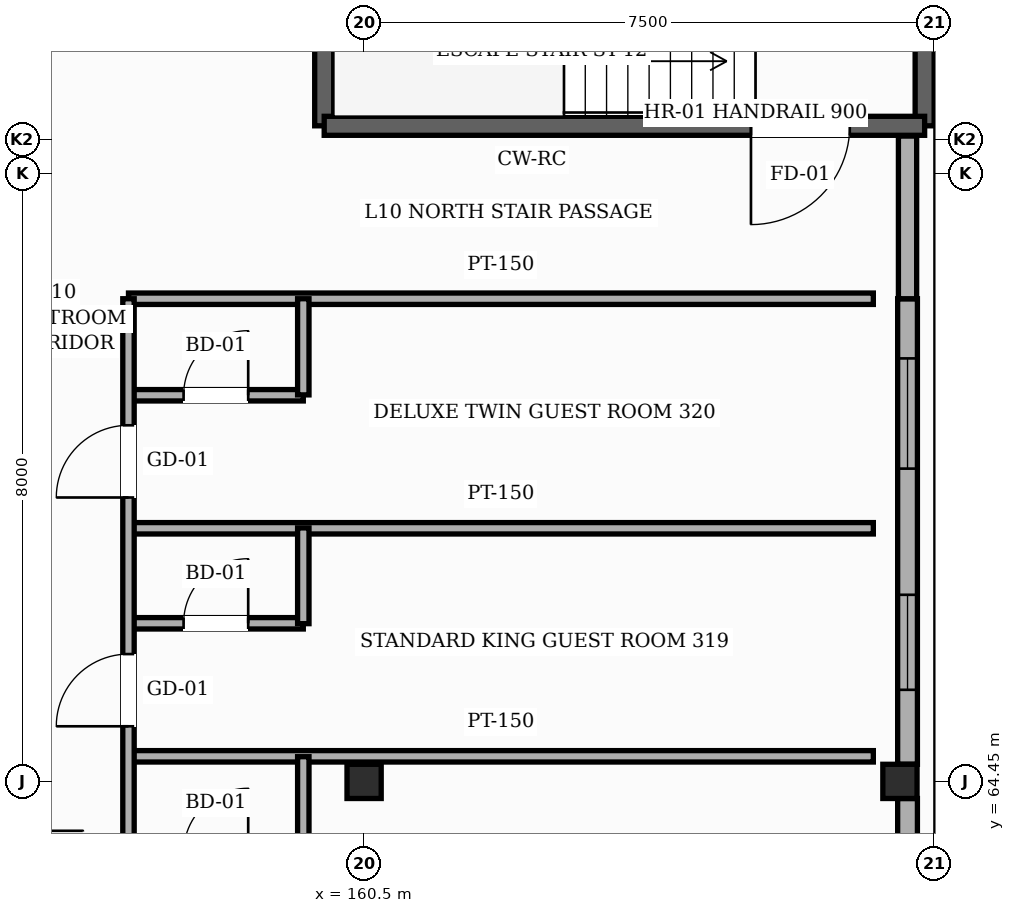
"""IFC4 building model, lengths in metres.
Left out: names, types, materials, properties, quantities, classifications, styles, units other than length and angle.
Written with IfcOpenShell. Run it as: python <this file> out.ifc"""

import sys

from ifc_helpers import new_model, si_unit, direction, frame, frame_2d, origin, origin_2d, place, context, subcontext, project, spatial, rectangle, hollow_rectangle, extrude, element, fill, save


model = new_model("IFC4")
c1 = context("Model", 3, precision=1e-05, world=origin(), true_north=direction((0.0, 1.0)))
c2 = subcontext(c1, "Body", "Model", "MODEL_VIEW")
j1 = project(units=[si_unit("LENGTHUNIT", "METRE"), si_unit("PLANEANGLEUNIT", "RADIAN")], contexts=[c1])
p1 = place(None, origin())
s1 = spatial("IfcSite", under=j1, at=p1, CompositionType="ELEMENT")
p2 = place(p1, origin())
s2 = spatial("IfcBuilding", under=s1, at=p2, CompositionType="ELEMENT")
p3 = place(p2, frame((0.0, 0.0, 42.6)))
s3 = spatial("IfcBuildingStorey", under=s2, at=p3, CompositionType="ELEMENT", Elevation=42.6)
for number, where, z_axis, x_axis in (
    (1, (160.5, 64.45, 0.0), (0.0, 0.0, 1.0), (1.0, 0.0, 0.0)),
    (2, (167.55, 64.45, 0.0), (0.0, 0.0, 1.0), (1.0, 0.0, 0.0)),
):
    element("IfcColumn", number, at=place(p3, frame(where, z_axis=z_axis, x_axis=x_axis)), inside=s3, PredefinedType="COLUMN", context=c2, shape_type="SweptSolid", body=[
        extrude(hollow_rectangle(XDim=0.45, YDim=0.45, WallThickness=0.019, InnerFilletRadius=0.019, OuterFilletRadius=0.038, at=origin_2d()), origin(), (0.0, 0.0, 1.0), 3.6),
    ])
p4 = place(p3, frame((167.65, 64.225, 0.0), z_axis=(0.0, 0.0, 1.0), x_axis=(0.0, -1.0, 0.0)))
e3 = element("IfcWall", 3, at=p4, inside=s3, PredefinedType="SOLIDWALL", context=c2, shape_type="SweptSolid", body=[
    extrude(rectangle(XDim=7.55, YDim=0.26, at=frame_2d((3.775, 0.0))), origin(), (0.0, 0.0, 1.0), 2.755),
])
p5 = place(p4, frame((6.085, 0.0, 0.85)))
e4 = element("IfcOpeningElement", 4, at=p5, cuts=e3, PredefinedType="OPENING", context=c2, shape_type="SweptSolid", body=[
    extrude(rectangle(XDim=0.85, YDim=1.35, at=frame_2d((0.425, 0.675))), frame((0.0, 0.14, 0.0), z_axis=(0.0, -1.0, 0.0), x_axis=(1.0, 0.0, 0.0)), (0.0, 0.0, 1.0), 0.28),
])
p6 = place(p4, frame((2.92, 0.0, 0.85)))
e5 = element("IfcOpeningElement", 5, at=p6, cuts=e3, PredefinedType="OPENING", context=c2, shape_type="SweptSolid", body=[
    extrude(rectangle(XDim=2.1, YDim=1.35, at=frame_2d((1.05, 0.675))), frame((0.0, 0.14, 0.0), z_axis=(0.0, -1.0, 0.0), x_axis=(1.0, 0.0, 0.0)), (0.0, 0.0, 1.0), 0.28),
])
p7 = place(p4, frame((0.81, 0.0, 0.85)))
e6 = element("IfcOpeningElement", 6, at=p7, cuts=e3, PredefinedType="OPENING", context=c2, shape_type="SweptSolid", body=[
    extrude(rectangle(XDim=0.85, YDim=1.35, at=frame_2d((0.425, 0.675))), frame((0.0, 0.14, 0.0), z_axis=(0.0, -1.0, 0.0), x_axis=(1.0, 0.0, 0.0)), (0.0, 0.0, 1.0), 0.28),
])
p8 = place(p3, frame((167.65, 70.8, 0.0), z_axis=(0.0, 0.0, 1.0), x_axis=(0.0, -1.0, 0.0)))
e7 = element("IfcWall", 7, at=p8, inside=s3, PredefinedType="SOLIDWALL", context=c2, shape_type="SweptSolid", body=[
    extrude(rectangle(XDim=6.125, YDim=0.26, at=frame_2d((3.062, 0.0))), origin(), (0.0, 0.0, 1.0), 3.365),
])
p9 = place(p8, frame((3.895, 0.0, 0.85)))
e8 = element("IfcOpeningElement", 8, at=p9, cuts=e7, PredefinedType="OPENING", context=c2, shape_type="SweptSolid", body=[
    extrude(rectangle(XDim=1.25, YDim=1.95, at=frame_2d((0.625, 0.975))), frame((0.0, 0.14, 0.0), z_axis=(0.0, -1.0, 0.0), x_axis=(1.0, 0.0, 0.0)), (0.0, 0.0, 1.0), 0.28),
])
p10 = place(p8, frame((0.785, 0.0, 0.85)))
e9 = element("IfcOpeningElement", 9, at=p10, cuts=e7, PredefinedType="OPENING", context=c2, shape_type="SweptSolid", body=[
    extrude(rectangle(XDim=1.45, YDim=1.95, at=frame_2d((0.725, 0.975))), frame((0.0, 0.14, 0.0), z_axis=(0.0, -1.0, 0.0), x_axis=(1.0, 0.0, 0.0)), (0.0, 0.0, 1.0), 0.28),
])
p11 = place(p3, frame((167.65, 72.94, 0.0), z_axis=(0.0, 0.0, 1.0), x_axis=(0.0, -1.0, 0.0)))
e10 = element("IfcWall", 10, at=p11, inside=s3, PredefinedType="SOLIDWALL", context=c2, shape_type="SweptSolid", body=[
    extrude(rectangle(XDim=2.14, YDim=0.24, at=frame_2d((1.07, 0.0))), origin(), (0.0, 0.0, 1.0), 3.365),
])
for number, where, z_axis, x_axis in (
    (11, (167.875, 76.425, 0.0), (0.0, 0.0, 1.0), (0.0, -1.0, 0.0)),
    (12, (159.975, 73.075, 0.0), (0.0, 0.0, 1.0), (0.0, 1.0, 0.0)),
):
    element("IfcWall", number, at=place(p3, frame(where, z_axis=z_axis, x_axis=x_axis)), inside=s3, PredefinedType="SHEAR", context=c2, shape_type="SweptSolid", body=[
        extrude(rectangle(XDim=3.35, YDim=0.25, at=frame_2d((1.675, 0.0))), origin(), (0.0, 0.0, 1.0), 3.38),
    ])
p12 = place(p3, frame((167.875, 73.075, 0.0), z_axis=(0.0, 0.0, 1.0), x_axis=(-1.0, 0.0, 0.0)))
e13 = element("IfcWall", 13, at=p12, inside=s3, PredefinedType="SHEAR", context=c2, shape_type="SweptSolid", body=[
    extrude(rectangle(XDim=7.9, YDim=0.25, at=frame_2d((3.95, 0.0))), origin(), (0.0, 0.0, 1.0), 3.38),
])
p13 = place(p12, frame((0.985, 0.0, 0.0)))
e14 = element("IfcOpeningElement", 14, at=p13, cuts=e13, PredefinedType="OPENING", context=c2, shape_type="SweptSolid", body=[
    extrude(rectangle(XDim=1.3, YDim=2.2, at=frame_2d((0.65, 1.1))), frame((0.0, 0.135, 0.0), z_axis=(0.0, -1.0, 0.0), x_axis=(1.0, 0.0, 0.0)), (0.0, 0.0, 1.0), 0.27),
])
p14 = place(p3, frame((157.4, 64.78, 0.0), z_axis=(0.0, 0.0, 1.0), x_axis=(1.0, 0.0, 0.0)))
e15 = element("IfcWall", 15, at=p14, inside=s3, PredefinedType="PARTITIONING", context=c2, shape_type="SweptSolid", body=[
    extrude(rectangle(XDim=9.8, YDim=0.15, at=frame_2d((4.9, 0.0))), origin(), (0.0, 0.0, 1.0), 3.365),
])
p15 = place(p3, frame((157.4, 66.53, 0.0), z_axis=(0.0, 0.0, 1.0), x_axis=(1.0, 0.0, 0.0)))
e16 = element("IfcWall", 16, at=p15, inside=s3, PredefinedType="PARTITIONING", context=c2, shape_type="SweptSolid", body=[
    extrude(rectangle(XDim=2.3, YDim=0.15, at=frame_2d((1.15, 0.0))), origin(), (0.0, 0.0, 1.0), 3.365),
])
p16 = place(p15, frame((0.725, 0.0, 0.0)))
e17 = element("IfcOpeningElement", 17, at=p16, cuts=e16, PredefinedType="OPENING", context=c2, shape_type="SweptSolid", body=[
    extrude(rectangle(XDim=0.85, YDim=2.1, at=frame_2d((0.425, 1.05))), frame((0.0, 0.085, 0.0), z_axis=(0.0, -1.0, 0.0), x_axis=(1.0, 0.0, 0.0)), (0.0, 0.0, 1.0), 0.17),
])
p17 = place(p3, frame((157.4, 67.78, 0.0), z_axis=(0.0, 0.0, 1.0), x_axis=(1.0, 0.0, 0.0)))
e18 = element("IfcWall", 18, at=p17, inside=s3, PredefinedType="PARTITIONING", context=c2, shape_type="SweptSolid", body=[
    extrude(rectangle(XDim=9.8, YDim=0.15, at=frame_2d((4.9, 0.0))), origin(), (0.0, 0.0, 1.0), 3.365),
])
p18 = place(p3, frame((157.4, 69.53, 0.0), z_axis=(0.0, 0.0, 1.0), x_axis=(1.0, 0.0, 0.0)))
e19 = element("IfcWall", 19, at=p18, inside=s3, PredefinedType="PARTITIONING", context=c2, shape_type="SweptSolid", body=[
    extrude(rectangle(XDim=2.3, YDim=0.15, at=frame_2d((1.15, 0.0))), origin(), (0.0, 0.0, 1.0), 3.365),
])
p19 = place(p18, frame((0.725, 0.0, 0.0)))
e20 = element("IfcOpeningElement", 20, at=p19, cuts=e19, PredefinedType="OPENING", context=c2, shape_type="SweptSolid", body=[
    extrude(rectangle(XDim=0.85, YDim=2.1, at=frame_2d((0.425, 1.05))), frame((0.0, 0.085, 0.0), z_axis=(0.0, -1.0, 0.0), x_axis=(1.0, 0.0, 0.0)), (0.0, 0.0, 1.0), 0.17),
])
p20 = place(p3, frame((157.4, 70.8, 0.0), z_axis=(0.0, 0.0, 1.0), x_axis=(1.0, 0.0, 0.0)))
e21 = element("IfcWall", 21, at=p20, inside=s3, PredefinedType="PARTITIONING", context=c2, shape_type="SweptSolid", body=[
    extrude(rectangle(XDim=9.8, YDim=0.15, at=frame_2d((4.9, 0.0))), origin(), (0.0, 0.0, 1.0), 3.365),
])
p21 = place(p3, frame((157.4, 22.6, 0.0), z_axis=(0.0, 0.0, 1.0), x_axis=(0.0, 1.0, 0.0)))
e22 = element("IfcWall", 22, at=p21, inside=s3, PredefinedType="PARTITIONING", context=c2, shape_type="SweptSolid", body=[
    extrude(rectangle(XDim=48.2, YDim=0.15, at=frame_2d((24.1, 0.0))), origin(), (0.0, 0.0, 1.0), 3.365),
])
p22 = place(p21, frame((0.325, 0.0, 0.0)))
e23 = element("IfcOpeningElement", 23, at=p22, cuts=e22, PredefinedType="OPENING", context=c2, shape_type="SweptSolid", body=[
    extrude(rectangle(XDim=1.1, YDim=2.2, at=frame_2d((0.55, 1.1))), frame((0.0, 0.085, 0.0), z_axis=(0.0, -1.0, 0.0), x_axis=(1.0, 0.0, 0.0)), (0.0, 0.0, 1.0), 0.17),
])
p23 = place(p21, frame((3.41, 0.0, 0.0)))
e24 = element("IfcOpeningElement", 24, at=p23, cuts=e22, PredefinedType="OPENING", context=c2, shape_type="SweptSolid", body=[
    extrude(rectangle(XDim=0.95, YDim=2.15, at=frame_2d((0.475, 1.075))), frame((0.0, 0.085, 0.0), z_axis=(0.0, -1.0, 0.0), x_axis=(1.0, 0.0, 0.0)), (0.0, 0.0, 1.0), 0.17),
])
p24 = place(p21, frame((6.425, 0.0, 0.0)))
e25 = element("IfcOpeningElement", 25, at=p24, cuts=e22, PredefinedType="OPENING", context=c2, shape_type="SweptSolid", body=[
    extrude(rectangle(XDim=0.95, YDim=2.15, at=frame_2d((0.475, 1.075))), frame((0.0, 0.085, 0.0), z_axis=(0.0, -1.0, 0.0), x_axis=(1.0, 0.0, 0.0)), (0.0, 0.0, 1.0), 0.17),
])
p25 = place(p21, frame((9.44, 0.0, 0.0)))
e26 = element("IfcOpeningElement", 26, at=p25, cuts=e22, PredefinedType="OPENING", context=c2, shape_type="SweptSolid", body=[
    extrude(rectangle(XDim=0.95, YDim=2.15, at=frame_2d((0.475, 1.075))), frame((0.0, 0.085, 0.0), z_axis=(0.0, -1.0, 0.0), x_axis=(1.0, 0.0, 0.0)), (0.0, 0.0, 1.0), 0.17),
])
p26 = place(p21, frame((12.45, 0.0, 0.0)))
e27 = element("IfcOpeningElement", 27, at=p26, cuts=e22, PredefinedType="OPENING", context=c2, shape_type="SweptSolid", body=[
    extrude(rectangle(XDim=0.95, YDim=2.15, at=frame_2d((0.475, 1.075))), frame((0.0, 0.085, 0.0), z_axis=(0.0, -1.0, 0.0), x_axis=(1.0, 0.0, 0.0)), (0.0, 0.0, 1.0), 0.17),
])
p27 = place(p21, frame((15.46, 0.0, 0.0)))
e28 = element("IfcOpeningElement", 28, at=p27, cuts=e22, PredefinedType="OPENING", context=c2, shape_type="SweptSolid", body=[
    extrude(rectangle(XDim=0.95, YDim=2.15, at=frame_2d((0.475, 1.075))), frame((0.0, 0.085, 0.0), z_axis=(0.0, -1.0, 0.0), x_axis=(1.0, 0.0, 0.0)), (0.0, 0.0, 1.0), 0.17),
])
p28 = place(p21, frame((18.475, 0.0, 0.0)))
e29 = element("IfcOpeningElement", 29, at=p28, cuts=e22, PredefinedType="OPENING", context=c2, shape_type="SweptSolid", body=[
    extrude(rectangle(XDim=0.95, YDim=2.15, at=frame_2d((0.475, 1.075))), frame((0.0, 0.085, 0.0), z_axis=(0.0, -1.0, 0.0), x_axis=(1.0, 0.0, 0.0)), (0.0, 0.0, 1.0), 0.17),
])
p29 = place(p21, frame((21.49, 0.0, 0.0)))
e30 = element("IfcOpeningElement", 30, at=p29, cuts=e22, PredefinedType="OPENING", context=c2, shape_type="SweptSolid", body=[
    extrude(rectangle(XDim=0.95, YDim=2.15, at=frame_2d((0.475, 1.075))), frame((0.0, 0.085, 0.0), z_axis=(0.0, -1.0, 0.0), x_axis=(1.0, 0.0, 0.0)), (0.0, 0.0, 1.0), 0.17),
])
p30 = place(p21, frame((24.5, 0.0, 0.0)))
e31 = element("IfcOpeningElement", 31, at=p30, cuts=e22, PredefinedType="OPENING", context=c2, shape_type="SweptSolid", body=[
    extrude(rectangle(XDim=0.95, YDim=2.15, at=frame_2d((0.475, 1.075))), frame((0.0, 0.085, 0.0), z_axis=(0.0, -1.0, 0.0), x_axis=(1.0, 0.0, 0.0)), (0.0, 0.0, 1.0), 0.17),
])
p31 = place(p21, frame((27.51, 0.0, 0.0)))
e32 = element("IfcOpeningElement", 32, at=p31, cuts=e22, PredefinedType="OPENING", context=c2, shape_type="SweptSolid", body=[
    extrude(rectangle(XDim=0.95, YDim=2.15, at=frame_2d((0.475, 1.075))), frame((0.0, 0.085, 0.0), z_axis=(0.0, -1.0, 0.0), x_axis=(1.0, 0.0, 0.0)), (0.0, 0.0, 1.0), 0.17),
])
p32 = place(p21, frame((30.525, 0.0, 0.0)))
e33 = element("IfcOpeningElement", 33, at=p32, cuts=e22, PredefinedType="OPENING", context=c2, shape_type="SweptSolid", body=[
    extrude(rectangle(XDim=0.95, YDim=2.15, at=frame_2d((0.475, 1.075))), frame((0.0, 0.085, 0.0), z_axis=(0.0, -1.0, 0.0), x_axis=(1.0, 0.0, 0.0)), (0.0, 0.0, 1.0), 0.17),
])
p33 = place(p21, frame((33.54, 0.0, 0.0)))
e34 = element("IfcOpeningElement", 34, at=p33, cuts=e22, PredefinedType="OPENING", context=c2, shape_type="SweptSolid", body=[
    extrude(rectangle(XDim=0.95, YDim=2.15, at=frame_2d((0.475, 1.075))), frame((0.0, 0.085, 0.0), z_axis=(0.0, -1.0, 0.0), x_axis=(1.0, 0.0, 0.0)), (0.0, 0.0, 1.0), 0.17),
])
p34 = place(p21, frame((36.55, 0.0, 0.0)))
e35 = element("IfcOpeningElement", 35, at=p34, cuts=e22, PredefinedType="OPENING", context=c2, shape_type="SweptSolid", body=[
    extrude(rectangle(XDim=0.95, YDim=2.15, at=frame_2d((0.475, 1.075))), frame((0.0, 0.085, 0.0), z_axis=(0.0, -1.0, 0.0), x_axis=(1.0, 0.0, 0.0)), (0.0, 0.0, 1.0), 0.17),
])
p35 = place(p21, frame((39.56, 0.0, 0.0)))
e36 = element("IfcOpeningElement", 36, at=p35, cuts=e22, PredefinedType="OPENING", context=c2, shape_type="SweptSolid", body=[
    extrude(rectangle(XDim=0.95, YDim=2.15, at=frame_2d((0.475, 1.075))), frame((0.0, 0.085, 0.0), z_axis=(0.0, -1.0, 0.0), x_axis=(1.0, 0.0, 0.0)), (0.0, 0.0, 1.0), 0.17),
])
p36 = place(p21, frame((42.575, 0.0, 0.0)))
e37 = element("IfcOpeningElement", 37, at=p36, cuts=e22, PredefinedType="OPENING", context=c2, shape_type="SweptSolid", body=[
    extrude(rectangle(XDim=0.95, YDim=2.15, at=frame_2d((0.475, 1.075))), frame((0.0, 0.085, 0.0), z_axis=(0.0, -1.0, 0.0), x_axis=(1.0, 0.0, 0.0)), (0.0, 0.0, 1.0), 0.17),
])
p37 = place(p21, frame((45.585, 0.0, 0.0)))
e38 = element("IfcOpeningElement", 38, at=p37, cuts=e22, PredefinedType="OPENING", context=c2, shape_type="SweptSolid", body=[
    extrude(rectangle(XDim=0.95, YDim=2.15, at=frame_2d((0.475, 1.075))), frame((0.0, 0.085, 0.0), z_axis=(0.0, -1.0, 0.0), x_axis=(1.0, 0.0, 0.0)), (0.0, 0.0, 1.0), 0.17),
])
p38 = place(p3, frame((159.7, 63.51, 0.0), z_axis=(0.0, 0.0, 1.0), x_axis=(0.0, 1.0, 0.0)))
e39 = element("IfcWall", 39, at=p38, inside=s3, PredefinedType="PARTITIONING", context=c2, shape_type="SweptSolid", body=[
    extrude(rectangle(XDim=1.265, YDim=0.15, at=frame_2d((0.632, 0.0))), origin(), (0.0, 0.0, 1.0), 3.365),
])
p39 = place(p3, frame((159.7, 66.525, 0.0), z_axis=(0.0, 0.0, 1.0), x_axis=(0.0, 1.0, 0.0)))
e40 = element("IfcWall", 40, at=p39, inside=s3, PredefinedType="PARTITIONING", context=c2, shape_type="SweptSolid", body=[
    extrude(rectangle(XDim=1.26, YDim=0.15, at=frame_2d((0.63, 0.0))), origin(), (0.0, 0.0, 1.0), 3.365),
])
p40 = place(p3, frame((159.7, 69.535, 0.0), z_axis=(0.0, 0.0, 1.0), x_axis=(0.0, 1.0, 0.0)))
e41 = element("IfcWall", 41, at=p40, inside=s3, PredefinedType="PARTITIONING", context=c2, shape_type="SweptSolid", body=[
    extrude(rectangle(XDim=1.265, YDim=0.15, at=frame_2d((0.633, 0.0))), origin(), (0.0, 0.0, 1.0), 3.365),
])
p41 = place(p9, origin())
e42 = element("IfcWindow", 42, at=p41, inside=s3, PartitioningType="SINGLE_PANEL", PredefinedType="WINDOW", context=c2, shape_type="SweptSolid", body=[
    extrude(rectangle(XDim=1.25, YDim=1.95, at=frame_2d((0.625, 0.975))), frame((0.0, 0.03, 0.0), z_axis=(0.0, -1.0, 0.0), x_axis=(1.0, 0.0, 0.0)), (0.0, 0.0, 1.0), 0.06),
])
fill(e8, e42)
p42 = place(p10, origin())
e43 = element("IfcWindow", 43, at=p42, inside=s3, PartitioningType="SINGLE_PANEL", PredefinedType="WINDOW", context=c2, shape_type="SweptSolid", body=[
    extrude(rectangle(XDim=1.45, YDim=1.95, at=frame_2d((0.725, 0.975))), frame((0.0, 0.03, 0.0), z_axis=(0.0, -1.0, 0.0), x_axis=(1.0, 0.0, 0.0)), (0.0, 0.0, 1.0), 0.06),
])
fill(e9, e43)
p43 = place(p13, origin())
e44 = element("IfcDoor", 44, at=p43, inside=s3, OperationType="SINGLE_SWING_RIGHT", PredefinedType="DOOR", context=c2, shape_type="SweptSolid", body=[
    extrude(rectangle(XDim=1.3, YDim=2.2, at=frame_2d((0.65, 1.1))), frame((0.0, 0.025, 0.0), z_axis=(0.0, -1.0, 0.0), x_axis=(1.0, 0.0, 0.0)), (0.0, 0.0, 1.0), 0.05),
])
fill(e14, e44)
p44 = place(p36, origin())
e45 = element("IfcDoor", 45, at=p44, inside=s3, OperationType="SINGLE_SWING_LEFT", PredefinedType="DOOR", context=c2, shape_type="SweptSolid", body=[
    extrude(rectangle(XDim=0.95, YDim=2.15, at=frame_2d((0.475, 1.075))), frame((0.0, 0.025, 0.0), z_axis=(0.0, -1.0, 0.0), x_axis=(1.0, 0.0, 0.0)), (0.0, 0.0, 1.0), 0.05),
])
fill(e37, e45)
p45 = place(p16, origin())
e46 = element("IfcDoor", 46, at=p45, inside=s3, OperationType="SINGLE_SWING_RIGHT", PredefinedType="DOOR", context=c2, shape_type="SweptSolid", body=[
    extrude(rectangle(XDim=0.85, YDim=2.1, at=frame_2d((0.425, 1.05))), frame((0.0, 0.025, 0.0), z_axis=(0.0, -1.0, 0.0), x_axis=(1.0, 0.0, 0.0)), (0.0, 0.0, 1.0), 0.05),
])
fill(e17, e46)
p46 = place(p37, origin())
e47 = element("IfcDoor", 47, at=p46, inside=s3, OperationType="SINGLE_SWING_LEFT", PredefinedType="DOOR", context=c2, shape_type="SweptSolid", body=[
    extrude(rectangle(XDim=0.95, YDim=2.15, at=frame_2d((0.475, 1.075))), frame((0.0, 0.025, 0.0), z_axis=(0.0, -1.0, 0.0), x_axis=(1.0, 0.0, 0.0)), (0.0, 0.0, 1.0), 0.05),
])
fill(e38, e47)
p47 = place(p19, origin())
e48 = element("IfcDoor", 48, at=p47, inside=s3, OperationType="SINGLE_SWING_RIGHT", PredefinedType="DOOR", context=c2, shape_type="SweptSolid", body=[
    extrude(rectangle(XDim=0.85, YDim=2.1, at=frame_2d((0.425, 1.05))), frame((0.0, 0.025, 0.0), z_axis=(0.0, -1.0, 0.0), x_axis=(1.0, 0.0, 0.0)), (0.0, 0.0, 1.0), 0.05),
])
fill(e20, e48)
save(model, sys.argv[1])
